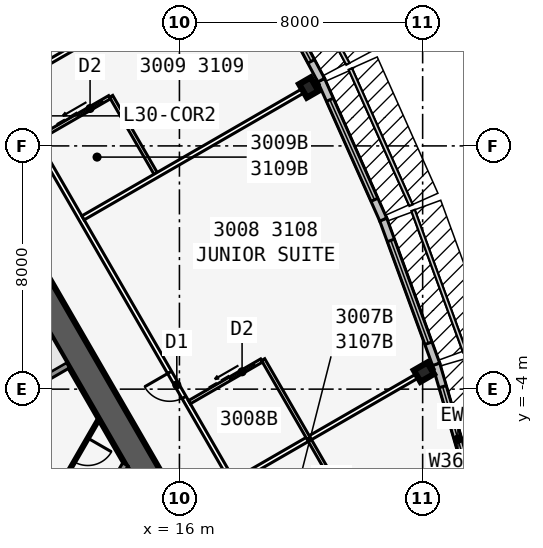
"""IFC4 building model, lengths in metres.
Left out: names, types, materials, properties, quantities, classifications, styles, units other than length and angle.
Written with IfcOpenShell. Run it as: python <this file> out.ifc"""

import sys

from ifc_helpers import new_model, si_unit, direction, frame, frame_2d, origin, origin_2d, place, context, subcontext, project, spatial, rectangle, i_section, extrude, element, fill, save


model = new_model("IFC4")
c1 = context("Model", 3, precision=1e-05, world=origin(), true_north=direction((0.0, 1.0)))
c2 = subcontext(c1, "Body", "Model", "MODEL_VIEW")
j1 = project(units=[si_unit("LENGTHUNIT", "METRE"), si_unit("PLANEANGLEUNIT", "RADIAN")], contexts=[c1])
p1 = place(None, origin())
s1 = spatial("IfcSite", under=j1, at=p1, CompositionType="ELEMENT")
p2 = place(p1, origin())
s2 = spatial("IfcBuilding", under=s1, at=p2, CompositionType="ELEMENT")
p3 = place(p2, frame((0.0, 0.0, 118.1)))
s3 = spatial("IfcBuildingStorey", under=s2, at=p3, CompositionType="ELEMENT", Elevation=118.1)
p4 = place(p3, frame((16.5, -9.526, 0.0), z_axis=(0.0, 0.0, 1.0), x_axis=(-0.499999749417, 0.866025548458, 0.0)))
e1 = element("IfcWall", 1, at=p4, inside=s3, PredefinedType="SHEAR", context=c2, shape_type="SweptSolid", body=[
    extrude(rectangle(XDim=33.0, YDim=0.9, at=frame_2d((16.5, 0.0))), origin(), (0.0, 0.0, 1.0), 3.4),
])
p5 = place(p4, frame((14.15, 0.0, 0.0)))
e2 = element("IfcOpeningElement", 2, at=p5, cuts=e1, PredefinedType="OPENING", context=c2, shape_type="SweptSolid", body=[
    extrude(rectangle(XDim=1.8, YDim=2.13, at=frame_2d((0.9, 1.065))), frame((0.0, 0.46, 0.0), z_axis=(0.0, -1.0, 0.0), x_axis=(1.0, 0.0, 0.0)), (0.0, 0.0, 1.0), 0.92),
])
p6 = place(p4, frame((12.6, 0.0, 0.0)))
e3 = element("IfcOpeningElement", 3, at=p6, cuts=e1, PredefinedType="OPENING", context=c2, shape_type="SweptSolid", body=[
    extrude(rectangle(XDim=1.0, YDim=2.13, at=frame_2d((0.5, 1.065))), frame((0.0, 0.46, 0.0), z_axis=(0.0, -1.0, 0.0), x_axis=(1.0, 0.0, 0.0)), (0.0, 0.0, 1.0), 0.92),
])
p7 = place(p3, frame((9.629, -4.775, 0.0), z_axis=(0.0, 0.0, 1.0), x_axis=(0.866022959057, 0.500004234368, 0.0)))
e4 = element("IfcWall", 4, at=p7, inside=s3, PredefinedType="SOLIDWALL", context=c2, shape_type="SweptSolid", body=[
    extrude(rectangle(XDim=3.125, YDim=0.2, at=frame_2d((1.562, 0.0))), origin(), (0.0, 0.0, 1.0), 3.235),
])
for number, where, z_axis, x_axis in (
    (5, (24.041, -3.44, 0.0), (0.0, 0.0, 1.0), (-0.5, 0.866, 0.0)),
    (6, (20.254, 5.92, 0.0), (0.0, 0.0, 1.0), (0.866, 0.5, 0.0)),
):
    element("IfcColumn", number, at=place(p3, frame(where, z_axis=z_axis, x_axis=x_axis)), inside=s3, PredefinedType="COLUMN", context=c2, shape_type="SweptSolid", body=[
        extrude(i_section(OverallWidth=0.437, OverallDepth=0.513, WebThickness=0.061, FlangeThickness=0.097, at=origin_2d()), origin(), (0.0, 0.0, 1.0), 3.4),
    ])
p8 = place(p3, frame((25.88, -8.118, 0.0), z_axis=(0.0, 0.0, 1.0), x_axis=(-0.279528287117, 0.960137457191, 0.0)))
e7 = element("IfcWall", 7, at=p8, inside=s3, PredefinedType="STANDARD", context=c2, shape_type="SweptSolid", body=[
    extrude(rectangle(XDim=5.148, YDim=0.25, at=frame_2d((2.574, 0.0))), origin(), (0.0, 0.0, 1.0), 3.235),
])
p9 = place(p8, frame((0.774, 0.0, 0.45)))
e8 = element("IfcOpeningElement", 8, at=p9, cuts=e7, PredefinedType="OPENING", context=c2, shape_type="SweptSolid", body=[
    extrude(rectangle(XDim=3.6, YDim=2.4, at=frame_2d((1.8, 1.2))), frame((0.0, 0.135, 0.0), z_axis=(0.0, -1.0, 0.0), x_axis=(1.0, 0.0, 0.0)), (0.0, 0.0, 1.0), 0.27),
])
p10 = place(p3, frame((24.444, -3.183, 0.0), z_axis=(0.0, 0.0, 1.0), x_axis=(-0.343225593282, 0.939252996863, 0.0)))
e9 = element("IfcWall", 9, at=p10, inside=s3, PredefinedType="STANDARD", context=c2, shape_type="SweptSolid", body=[
    extrude(rectangle(XDim=5.076, YDim=0.25, at=frame_2d((2.538, 0.0))), origin(), (0.0, 0.0, 1.0), 3.235),
])
p11 = place(p10, frame((0.738, 0.0, 0.45)))
e10 = element("IfcOpeningElement", 10, at=p11, cuts=e9, PredefinedType="OPENING", context=c2, shape_type="SweptSolid", body=[
    extrude(rectangle(XDim=3.6, YDim=2.4, at=frame_2d((1.8, 1.2))), frame((0.0, 0.135, 0.0), z_axis=(0.0, -1.0, 0.0), x_axis=(1.0, 0.0, 0.0)), (0.0, 0.0, 1.0), 0.27),
])
p12 = place(p3, frame((22.705, 1.576, 0.0), z_axis=(0.0, 0.0, 1.0), x_axis=(-0.406832200364, 0.913502906808, 0.0)))
e11 = element("IfcWall", 11, at=p12, inside=s3, PredefinedType="STANDARD", context=c2, shape_type="SweptSolid", body=[
    extrude(rectangle(XDim=5.028, YDim=0.25, at=frame_2d((2.514, 0.0))), origin(), (0.0, 0.0, 1.0), 3.235),
])
p13 = place(p12, frame((0.714, 0.0, 0.45)))
e12 = element("IfcOpeningElement", 12, at=p13, cuts=e11, PredefinedType="OPENING", context=c2, shape_type="SweptSolid", body=[
    extrude(rectangle(XDim=3.6, YDim=2.4, at=frame_2d((1.8, 1.2))), frame((0.0, 0.135, 0.0), z_axis=(0.0, -1.0, 0.0), x_axis=(1.0, 0.0, 0.0)), (0.0, 0.0, 1.0), 0.27),
])
p14 = place(p3, frame((20.663, 6.161, 0.0), z_axis=(0.0, 0.0, 1.0), x_axis=(-0.469404966864, 0.882982999317, 0.0)))
e13 = element("IfcWall", 13, at=p14, inside=s3, PredefinedType="STANDARD", context=c2, shape_type="SweptSolid", body=[
    extrude(rectangle(XDim=5.003, YDim=0.25, at=frame_2d((2.501, 0.0))), origin(), (0.0, 0.0, 1.0), 3.235),
])
p15 = place(p14, frame((0.701, 0.0, 0.45)))
e14 = element("IfcOpeningElement", 14, at=p15, cuts=e13, PredefinedType="OPENING", context=c2, shape_type="SweptSolid", body=[
    extrude(rectangle(XDim=3.6, YDim=2.4, at=frame_2d((1.8, 1.2))), frame((0.0, 0.135, 0.0), z_axis=(0.0, -1.0, 0.0), x_axis=(1.0, 0.0, 0.0)), (0.0, 0.0, 1.0), 0.27),
])
p16 = place(p3, frame((20.027, -10.985, 0.0), z_axis=(0.0, 0.0, 1.0), x_axis=(-0.500001677587, 0.866024435227, 0.0)))
e15 = element("IfcWall", 15, at=p16, inside=s3, PredefinedType="PARTITIONING", context=c2, shape_type="SweptSolid", body=[
    extrude(rectangle(XDim=39.054, YDim=0.15, at=frame_2d((19.527, 0.0))), origin(), (0.0, 0.0, 1.0), 3.235),
])
p17 = place(p16, frame((0.352, 0.0, 0.0)))
e16 = element("IfcOpeningElement", 16, at=p17, cuts=e15, PredefinedType="OPENING", context=c2, shape_type="SweptSolid", body=[
    extrude(rectangle(XDim=0.95, YDim=2.13, at=frame_2d((0.475, 1.065))), frame((0.0, 0.085, 0.0), z_axis=(0.0, -1.0, 0.0), x_axis=(1.0, 0.0, 0.0)), (0.0, 0.0, 1.0), 0.17),
])
p18 = place(p16, frame((7.752, 0.0, 0.0)))
e17 = element("IfcOpeningElement", 17, at=p18, cuts=e15, PredefinedType="OPENING", context=c2, shape_type="SweptSolid", body=[
    extrude(rectangle(XDim=0.95, YDim=2.13, at=frame_2d((0.475, 1.065))), frame((0.0, 0.085, 0.0), z_axis=(0.0, -1.0, 0.0), x_axis=(1.0, 0.0, 0.0)), (0.0, 0.0, 1.0), 0.17),
])
p19 = place(p16, frame((17.752, 0.0, 0.0)))
e18 = element("IfcOpeningElement", 18, at=p19, cuts=e15, PredefinedType="OPENING", context=c2, shape_type="SweptSolid", body=[
    extrude(rectangle(XDim=0.95, YDim=2.13, at=frame_2d((0.475, 1.065))), frame((0.0, 0.085, 0.0), z_axis=(0.0, -1.0, 0.0), x_axis=(1.0, 0.0, 0.0)), (0.0, 0.0, 1.0), 0.17),
])
p20 = place(p16, frame((22.152, 0.0, 0.0)))
e19 = element("IfcOpeningElement", 19, at=p20, cuts=e15, PredefinedType="OPENING", context=c2, shape_type="SweptSolid", body=[
    extrude(rectangle(XDim=0.95, YDim=2.13, at=frame_2d((0.475, 1.065))), frame((0.0, 0.085, 0.0), z_axis=(0.0, -1.0, 0.0), x_axis=(1.0, 0.0, 0.0)), (0.0, 0.0, 1.0), 0.17),
])
p21 = place(p16, frame((27.152, 0.0, 0.0)))
e20 = element("IfcOpeningElement", 20, at=p21, cuts=e15, PredefinedType="OPENING", context=c2, shape_type="SweptSolid", body=[
    extrude(rectangle(XDim=0.95, YDim=2.13, at=frame_2d((0.475, 1.065))), frame((0.0, 0.085, 0.0), z_axis=(0.0, -1.0, 0.0), x_axis=(1.0, 0.0, 0.0)), (0.0, 0.0, 1.0), 0.17),
])
p22 = place(p16, frame((36.546, 0.0, 0.0)))
e21 = element("IfcOpeningElement", 21, at=p22, cuts=e15, PredefinedType="OPENING", context=c2, shape_type="SweptSolid", body=[
    extrude(rectangle(XDim=0.95, YDim=2.13, at=frame_2d((0.475, 1.065))), frame((0.0, 0.085, 0.0), z_axis=(0.0, -1.0, 0.0), x_axis=(1.0, 0.0, 0.0)), (0.0, 0.0, 1.0), 0.17),
])
p23 = place(p3, frame((17.829, -7.027, 0.0), z_axis=(0.0, 0.0, 1.0), x_axis=(0.866029804378, 0.499992377871, 0.0)))
e22 = element("IfcWall", 22, at=p23, inside=s3, PredefinedType="PARTITIONING", context=c2, shape_type="SweptSolid", body=[
    extrude(rectangle(XDim=7.516, YDim=0.15, at=frame_2d((3.758, 0.0))), origin(), (0.0, 0.0, 1.0), 2.389),
])
p24 = place(p3, frame((12.829, 1.633, 0.0), z_axis=(0.0, 0.0, 1.0), x_axis=(0.866027015393, 0.499997208602, 0.0)))
e23 = element("IfcWall", 23, at=p24, inside=s3, PredefinedType="PARTITIONING", context=c2, shape_type="SweptSolid", body=[
    extrude(rectangle(XDim=8.922, YDim=0.15, at=frame_2d((4.461, 0.0))), origin(), (0.0, 0.0, 1.0), 2.389),
])
p25 = place(p3, frame((10.329, 5.963, 0.0), z_axis=(0.0, 0.0, 1.0), x_axis=(0.866025170687, 0.500000403736, 0.0)))
e24 = element("IfcWall", 24, at=p25, inside=s3, PredefinedType="PARTITIONING", context=c2, shape_type="SweptSolid", body=[
    extrude(rectangle(XDim=9.099, YDim=0.15, at=frame_2d((4.549, 0.0))), origin(), (0.0, 0.0, 1.0), 2.389),
])
p26 = place(p3, frame((21.753, -8.225, 0.0), z_axis=(0.0, 0.0, 1.0), x_axis=(-0.499990139034, 0.866031096941, 0.0)))
e25 = element("IfcWall", 25, at=p26, inside=s3, PredefinedType="PLUMBINGWALL", context=c2, shape_type="SweptSolid", body=[
    extrude(rectangle(XDim=3.0, YDim=0.12, at=frame_2d((1.5, 0.0))), origin(), (0.0, 0.0, 1.0), 3.235),
])
p27 = place(p3, frame((20.253, -5.627, 0.0), z_axis=(0.0, 0.0, 1.0), x_axis=(-0.50002537861, 0.866010750942, 0.0)))
e26 = element("IfcWall", 26, at=p27, inside=s3, PredefinedType="PLUMBINGWALL", context=c2, shape_type="SweptSolid", body=[
    extrude(rectangle(XDim=3.0, YDim=0.12, at=frame_2d((1.5, 0.0))), origin(), (0.0, 0.0, 1.0), 3.235),
])
p28 = place(p3, frame((16.329, -4.429, 0.0), z_axis=(0.0, 0.0, 1.0), x_axis=(0.865997131366, 0.500048966069, 0.0)))
e27 = element("IfcWall", 27, at=p28, inside=s3, PredefinedType="PLUMBINGWALL", context=c2, shape_type="SweptSolid", body=[
    extrude(rectangle(XDim=2.74, YDim=0.12, at=frame_2d((1.37, 0.0))), origin(), (0.0, 0.0, 1.0), 3.235),
])
p29 = place(p28, frame((1.55, 0.0, 0.0)))
e28 = element("IfcOpeningElement", 28, at=p29, cuts=e27, PredefinedType="OPENING", context=c2, shape_type="SweptSolid", body=[
    extrude(rectangle(XDim=0.9, YDim=2.13, at=frame_2d((0.45, 1.065))), frame((0.0, 0.07, 0.0), z_axis=(0.0, -1.0, 0.0), x_axis=(1.0, 0.0, 0.0)), (0.0, 0.0, 1.0), 0.14),
])
p30 = place(p3, frame((15.253, 3.033, 0.0), z_axis=(0.0, 0.0, 1.0), x_axis=(-0.499990139034, 0.866031096941, 0.0)))
e29 = element("IfcWall", 29, at=p30, inside=s3, PredefinedType="PLUMBINGWALL", context=c2, shape_type="SweptSolid", body=[
    extrude(rectangle(XDim=3.0, YDim=0.12, at=frame_2d((1.5, 0.0))), origin(), (0.0, 0.0, 1.0), 3.235),
])
p31 = place(p3, frame((11.329, 4.231, 0.0), z_axis=(0.0, 0.0, 1.0), x_axis=(0.866035715982, 0.499982138324, 0.0)))
e30 = element("IfcWall", 30, at=p31, inside=s3, PredefinedType="PLUMBINGWALL", context=c2, shape_type="SweptSolid", body=[
    extrude(rectangle(XDim=2.74, YDim=0.12, at=frame_2d((1.37, 0.0))), origin(), (0.0, 0.0, 1.0), 3.235),
])
p32 = place(p31, frame((1.55, 0.0, 0.0)))
e31 = element("IfcOpeningElement", 31, at=p32, cuts=e30, PredefinedType="OPENING", context=c2, shape_type="SweptSolid", body=[
    extrude(rectangle(XDim=0.9, YDim=2.13, at=frame_2d((0.45, 1.065))), frame((0.0, 0.07, 0.0), z_axis=(0.0, -1.0, 0.0), x_axis=(1.0, 0.0, 0.0)), (0.0, 0.0, 1.0), 0.14),
])
p33 = place(p3, frame((14.219, -6.476, 0.0), z_axis=(0.0, 0.0, 1.0), x_axis=(-0.499952404951, -0.866052881055, 0.0)))
e32 = element("IfcWall", 32, at=p33, inside=s3, PredefinedType="SOLIDWALL", context=c2, shape_type="SweptSolid", body=[
    extrude(rectangle(XDim=3.002, YDim=0.2, at=frame_2d((1.501, 0.0))), origin(), (0.0, 0.0, 1.0), 3.235),
])
p34 = place(p3, frame((13.354, -4.976, 0.0), z_axis=(0.0, 0.0, 1.0), x_axis=(-0.499999210213, -0.866025859768, 0.0)))
e33 = element("IfcWall", 33, at=p34, inside=s3, PredefinedType="PARTITIONING", context=c2, shape_type="SweptSolid", body=[
    extrude(rectangle(XDim=4.734, YDim=0.1, at=frame_2d((2.367, 0.0))), origin(), (0.0, 0.0, 1.0), 3.235),
])
p35 = place(p34, frame((0.734, 0.0, 0.0)))
e34 = element("IfcOpeningElement", 34, at=p35, cuts=e33, PredefinedType="OPENING", context=c2, shape_type="SweptSolid", body=[
    extrude(rectangle(XDim=0.9, YDim=2.13, at=frame_2d((0.45, 1.065))), frame((0.0, 0.06, 0.0), z_axis=(0.0, -1.0, 0.0), x_axis=(1.0, 0.0, 0.0)), (0.0, 0.0, 1.0), 0.12),
])
p36 = place(p3, frame((12.17, -7.026, 0.0), z_axis=(0.0, 0.0, 1.0), x_axis=(-0.866015833478, 0.50001657589, 0.0)))
e35 = element("IfcWall", 35, at=p36, inside=s3, PredefinedType="PARTITIONING", context=c2, shape_type="SweptSolid", body=[
    extrude(rectangle(XDim=2.275, YDim=0.1, at=frame_2d((1.138, 0.0))), origin(), (0.0, 0.0, 1.0), 3.235),
])
p37 = place(p36, frame((0.915, 0.0, 0.0)))
e36 = element("IfcOpeningElement", 36, at=p37, cuts=e35, PredefinedType="OPENING", context=c2, shape_type="SweptSolid", body=[
    extrude(rectangle(XDim=0.9, YDim=2.13, at=frame_2d((0.45, 1.065))), frame((0.0, 0.06, 0.0), z_axis=(0.0, -1.0, 0.0), x_axis=(1.0, 0.0, 0.0)), (0.0, 0.0, 1.0), 0.12),
])
p38 = place(p9, origin())
e37 = element("IfcWindow", 37, at=p38, inside=s3, PartitioningType="SINGLE_PANEL", PredefinedType="WINDOW", context=c2, shape_type="SweptSolid", body=[
    extrude(rectangle(XDim=3.6, YDim=2.4, at=frame_2d((1.8, 1.2))), frame((0.0, 0.03, 0.0), z_axis=(0.0, -1.0, 0.0), x_axis=(1.0, 0.0, 0.0)), (0.0, 0.0, 1.0), 0.06),
])
fill(e8, e37)
p39 = place(p11, origin())
e38 = element("IfcWindow", 38, at=p39, inside=s3, PartitioningType="SINGLE_PANEL", PredefinedType="WINDOW", context=c2, shape_type="SweptSolid", body=[
    extrude(rectangle(XDim=3.6, YDim=2.4, at=frame_2d((1.8, 1.2))), frame((0.0, 0.03, 0.0), z_axis=(0.0, -1.0, 0.0), x_axis=(1.0, 0.0, 0.0)), (0.0, 0.0, 1.0), 0.06),
])
fill(e10, e38)
p40 = place(p13, origin())
e39 = element("IfcWindow", 39, at=p40, inside=s3, PartitioningType="SINGLE_PANEL", PredefinedType="WINDOW", context=c2, shape_type="SweptSolid", body=[
    extrude(rectangle(XDim=3.6, YDim=2.4, at=frame_2d((1.8, 1.2))), frame((0.0, 0.03, 0.0), z_axis=(0.0, -1.0, 0.0), x_axis=(1.0, 0.0, 0.0)), (0.0, 0.0, 1.0), 0.06),
])
fill(e12, e39)
p41 = place(p15, origin())
e40 = element("IfcWindow", 40, at=p41, inside=s3, PartitioningType="SINGLE_PANEL", PredefinedType="WINDOW", context=c2, shape_type="SweptSolid", body=[
    extrude(rectangle(XDim=3.6, YDim=2.4, at=frame_2d((1.8, 1.2))), frame((0.0, 0.03, 0.0), z_axis=(0.0, -1.0, 0.0), x_axis=(1.0, 0.0, 0.0)), (0.0, 0.0, 1.0), 0.06),
])
fill(e14, e40)
p42 = place(p29, origin())
e41 = element("IfcDoor", 41, at=p42, inside=s3, OperationType="SLIDING_TO_LEFT", PredefinedType="DOOR", context=c2, shape_type="SweptSolid", body=[
    extrude(rectangle(XDim=0.9, YDim=2.13, at=frame_2d((0.45, 1.065))), frame((0.0, 0.025, 0.0), z_axis=(0.0, -1.0, 0.0), x_axis=(1.0, 0.0, 0.0)), (0.0, 0.0, 1.0), 0.05),
])
fill(e28, e41)
p43 = place(p18, origin())
e42 = element("IfcDoor", 42, at=p43, inside=s3, OperationType="SINGLE_SWING_RIGHT", PredefinedType="DOOR", context=c2, shape_type="SweptSolid", body=[
    extrude(rectangle(XDim=0.95, YDim=2.13, at=frame_2d((0.475, 1.065))), frame((0.0, 0.025, 0.0), z_axis=(0.0, -1.0, 0.0), x_axis=(1.0, 0.0, 0.0)), (0.0, 0.0, 1.0), 0.05),
])
fill(e17, e42)
p44 = place(p32, origin())
e43 = element("IfcDoor", 43, at=p44, inside=s3, OperationType="SLIDING_TO_LEFT", PredefinedType="DOOR", context=c2, shape_type="SweptSolid", body=[
    extrude(rectangle(XDim=0.9, YDim=2.13, at=frame_2d((0.45, 1.065))), frame((0.0, 0.025, 0.0), z_axis=(0.0, -1.0, 0.0), x_axis=(1.0, 0.0, 0.0)), (0.0, 0.0, 1.0), 0.05),
])
fill(e31, e43)
p45 = place(p35, origin())
e44 = element("IfcDoor", 44, at=p45, inside=s3, OperationType="SINGLE_SWING_LEFT", PredefinedType="DOOR", context=c2, shape_type="SweptSolid", body=[
    extrude(rectangle(XDim=0.9, YDim=2.13, at=frame_2d((0.45, 1.065))), frame((0.0, 0.025, 0.0), z_axis=(0.0, -1.0, 0.0), x_axis=(1.0, 0.0, 0.0)), (0.0, 0.0, 1.0), 0.05),
])
fill(e34, e44)
save(model, sys.argv[1])
